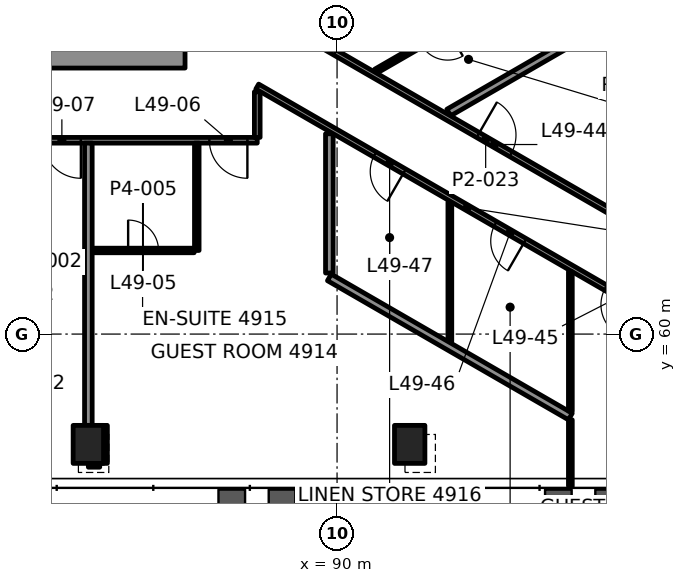
"""IFC4 building model, lengths in metres.
Left out: names, types, materials, properties, quantities, classifications, styles, units other than length and angle.
Written with IfcOpenShell. Run it as: python <this file> out.ifc"""

import sys

from ifc_helpers import new_model, si_unit, direction, frame, frame_2d, origin, origin_2d, place, context, subcontext, project, spatial, rectangle, hollow_rectangle, extrude, element, fill, save


model = new_model("IFC4")
c1 = context("Model", 3, precision=1e-05, world=origin(), true_north=direction((0.0, 1.0)))
c2 = subcontext(c1, "Body", "Model", "MODEL_VIEW")
j1 = project(units=[si_unit("LENGTHUNIT", "METRE"), si_unit("PLANEANGLEUNIT", "RADIAN")], contexts=[c1])
p1 = place(None, origin())
s1 = spatial("IfcSite", under=j1, at=p1, CompositionType="ELEMENT")
p2 = place(p1, origin())
s2 = spatial("IfcBuilding", under=s1, at=p2, CompositionType="ELEMENT")
p3 = place(p2, frame((0.0, 0.0, 210.4)))
s3 = spatial("IfcBuildingStorey", under=s2, at=p3, CompositionType="ELEMENT", Elevation=210.4)
for number, where, z_axis, x_axis in (
    (1, (83.456, 57.097, -0.0), (0.0, 0.0, 1.0), (1.0, 0.0, 0.0)),
    (2, (91.911, 57.097, -0.0), (0.0, 0.0, 1.0), (1.0, 0.0, 0.0)),
):
    element("IfcColumn", number, at=place(p3, frame(where, z_axis=z_axis, x_axis=x_axis)), inside=s3, PredefinedType="COLUMN", context=c2, shape_type="SweptSolid", body=[
        extrude(hollow_rectangle(XDim=0.8, YDim=1.0, WallThickness=0.05, at=origin_2d()), origin(), (0.0, 0.0, 1.0), 3.9),
    ])
p4 = place(p3, frame((64.0, 67.375, 0.0), z_axis=(0.0, 0.0, 1.0), x_axis=(1.0, 0.0, 0.0)))
e3 = element("IfcWall", 3, at=p4, inside=s3, PredefinedType="SHEAR", context=c2, shape_type="SweptSolid", body=[
    extrude(rectangle(XDim=22.0, YDim=0.75, at=frame_2d((11.0, 0.0))), origin(), (0.0, 0.0, 1.0), 3.7),
])
p5 = place(p4, frame((1.575, 0.0, 0.0)))
e4 = element("IfcOpeningElement", 4, at=p5, cuts=e3, PredefinedType="OPENING", context=c2, shape_type="SweptSolid", body=[
    extrude(rectangle(XDim=0.9, YDim=2.1, at=frame_2d((0.45, 1.05))), frame((0.0, 0.385, 0.0), z_axis=(0.0, -1.0, 0.0), x_axis=(1.0, 0.0, 0.0)), (0.0, 0.0, 1.0), 0.77),
])
p6 = place(p4, frame((4.425, 0.0, 0.0)))
e5 = element("IfcOpeningElement", 5, at=p6, cuts=e3, PredefinedType="OPENING", context=c2, shape_type="SweptSolid", body=[
    extrude(rectangle(XDim=0.9, YDim=2.1, at=frame_2d((0.45, 1.05))), frame((0.0, 0.385, 0.0), z_axis=(0.0, -1.0, 0.0), x_axis=(1.0, 0.0, 0.0)), (0.0, 0.0, 1.0), 0.77),
])
p7 = place(p3, frame((83.456, 56.597, 0.0), z_axis=(0.0, 0.0, 1.0), x_axis=(1.0, 0.0, 0.0)))
e6 = element("IfcWall", 6, at=p7, inside=s3, PredefinedType="PARTITIONING", context=c2, shape_type="SweptSolid", body=[
    extrude(rectangle(XDim=0.3, YDim=0.2, at=frame_2d((0.15, 0.0))), origin(), (0.0, 0.0, 1.0), 3.1),
])
p8 = place(p3, frame((83.566, 62.2, 0.0), z_axis=(0.0, 0.0, 1.0), x_axis=(1.0, 0.0, 0.0)))
e7 = element("IfcWall", 7, at=p8, inside=s3, PredefinedType="PARTITIONING", context=c2, shape_type="SweptSolid", body=[
    extrude(rectangle(XDim=2.674, YDim=0.12, at=frame_2d((1.337, 0.0))), origin(), (0.0, 0.0, 1.0), 3.1),
])
p9 = place(p8, frame((0.937, 0.0, 0.0)))
e8 = element("IfcOpeningElement", 8, at=p9, cuts=e7, PredefinedType="OPENING", context=c2, shape_type="SweptSolid", body=[
    extrude(rectangle(XDim=0.8, YDim=2.1, at=frame_2d((0.4, 1.05))), frame((0.0, 0.07, 0.0), z_axis=(0.0, -1.0, 0.0), x_axis=(1.0, 0.0, 0.0)), (0.0, 0.0, 1.0), 0.14),
])
p10 = place(p3, frame((87.899, 65.1, 0.0), z_axis=(0.0, 0.0, 1.0), x_axis=(-1.0, 0.0, 0.0)))
e9 = element("IfcWall", 9, at=p10, inside=s3, PredefinedType="PARTITIONING", context=c2, shape_type="SweptSolid", body=[
    extrude(rectangle(XDim=25.799, YDim=0.15, at=frame_2d((12.899, 0.0))), origin(), (0.0, 0.0, 1.0), 3.1),
])
p11 = place(p10, frame((0.259, 0.0, 0.0)))
e10 = element("IfcOpeningElement", 10, at=p11, cuts=e9, PredefinedType="OPENING", context=c2, shape_type="SweptSolid", body=[
    extrude(rectangle(XDim=1.0, YDim=2.1, at=frame_2d((0.5, 1.05))), frame((0.0, 0.085, 0.0), z_axis=(0.0, -1.0, 0.0), x_axis=(1.0, 0.0, 0.0)), (0.0, 0.0, 1.0), 0.17),
])
p12 = place(p10, frame((4.641, 0.0, 0.0)))
e11 = element("IfcOpeningElement", 11, at=p12, cuts=e9, PredefinedType="OPENING", context=c2, shape_type="SweptSolid", body=[
    extrude(rectangle(XDim=1.0, YDim=2.1, at=frame_2d((0.5, 1.05))), frame((0.0, 0.085, 0.0), z_axis=(0.0, -1.0, 0.0), x_axis=(1.0, 0.0, 0.0)), (0.0, 0.0, 1.0), 0.17),
])
p13 = place(p10, frame((8.868, 0.0, 0.0)))
e12 = element("IfcOpeningElement", 12, at=p13, cuts=e9, PredefinedType="OPENING", context=c2, shape_type="SweptSolid", body=[
    extrude(rectangle(XDim=1.0, YDim=2.1, at=frame_2d((0.5, 1.05))), frame((0.0, 0.085, 0.0), z_axis=(0.0, -1.0, 0.0), x_axis=(1.0, 0.0, 0.0)), (0.0, 0.0, 1.0), 0.17),
])
p14 = place(p10, frame((13.271, 0.0, 0.0)))
e13 = element("IfcOpeningElement", 13, at=p14, cuts=e9, PredefinedType="OPENING", context=c2, shape_type="SweptSolid", body=[
    extrude(rectangle(XDim=1.0, YDim=2.1, at=frame_2d((0.5, 1.05))), frame((0.0, 0.085, 0.0), z_axis=(0.0, -1.0, 0.0), x_axis=(1.0, 0.0, 0.0)), (0.0, 0.0, 1.0), 0.17),
])
p15 = place(p10, frame((19.612, 0.0, 0.0)))
e14 = element("IfcOpeningElement", 14, at=p15, cuts=e9, PredefinedType="OPENING", context=c2, shape_type="SweptSolid", body=[
    extrude(rectangle(XDim=1.0, YDim=2.1, at=frame_2d((0.5, 1.05))), frame((0.0, 0.085, 0.0), z_axis=(0.0, -1.0, 0.0), x_axis=(1.0, 0.0, 0.0)), (0.0, 0.0, 1.0), 0.17),
])
p16 = place(p3, frame((92.938, 65.83, 0.0), z_axis=(0.0, 0.0, 1.0), x_axis=(0.866041300655, 0.499972464802, 0.0)))
e15 = element("IfcWall", 15, at=p16, inside=s3, PredefinedType="PARTITIONING", context=c2, shape_type="SweptSolid", body=[
    extrude(rectangle(XDim=6.452, YDim=0.2, at=frame_2d((3.226, 0.0))), origin(), (0.0, 0.0, 1.0), 3.1),
])
p17 = place(p3, frame((94.109, 68.702, 0.0), z_axis=(0.0, 0.0, 1.0), x_axis=(-0.866028357664, -0.499994883695, 0.0)))
e16 = element("IfcWall", 16, at=p17, inside=s3, PredefinedType="PARTITIONING", context=c2, shape_type="SweptSolid", body=[
    extrude(rectangle(XDim=3.568, YDim=0.12, at=frame_2d((1.784, 0.0))), origin(), (0.0, 0.0, 1.0), 3.1),
])
p18 = place(p17, frame((1.384, 0.0, 0.0)))
e17 = element("IfcOpeningElement", 17, at=p18, cuts=e16, PredefinedType="OPENING", context=c2, shape_type="SweptSolid", body=[
    extrude(rectangle(XDim=0.8, YDim=2.1, at=frame_2d((0.4, 1.05))), frame((0.0, 0.07, 0.0), z_axis=(0.0, -1.0, 0.0), x_axis=(1.0, 0.0, 0.0)), (0.0, 0.0, 1.0), 0.14),
])
p19 = place(p3, frame((96.139, 55.998, 0.0), z_axis=(0.0, 0.0, 1.0), x_axis=(0.0, 1.0, 0.0)))
e18 = element("IfcWall", 18, at=p19, inside=s3, PredefinedType="PARTITIONING", context=c2, shape_type="SweptSolid", body=[
    extrude(rectangle(XDim=1.746, YDim=0.1, at=frame_2d((0.873, 0.0))), origin(), (0.0, 0.0, 1.0), 3.1),
])
p20 = place(p3, frame((92.968, 59.806, 0.0), z_axis=(0.0, 0.0, 1.0), x_axis=(0.0, 1.0, 0.0)))
e19 = element("IfcWall", 19, at=p20, inside=s3, PredefinedType="PARTITIONING", context=c2, shape_type="SweptSolid", body=[
    extrude(rectangle(XDim=3.664, YDim=0.1, at=frame_2d((1.832, 0.0))), origin(), (0.0, 0.0, 1.0), 3.1),
])
p21 = place(p3, frame((89.797, 61.607, 0.0), z_axis=(0.0, 0.0, 1.0), x_axis=(0.0, 1.0, 0.0)))
e20 = element("IfcWall", 20, at=p21, inside=s3, PredefinedType="PARTITIONING", context=c2, shape_type="SweptSolid", body=[
    extrude(rectangle(XDim=3.664, YDim=0.2, at=frame_2d((1.832, 0.0))), origin(), (0.0, 0.0, 1.0), 2.947),
])
p22 = place(p3, frame((87.9, 65.176, 0.0), z_axis=(0.0, 0.0, 1.0), x_axis=(0.0, 1.0, 0.0)))
e21 = element("IfcWall", 21, at=p22, inside=s3, PredefinedType="PARTITIONING", context=c2, shape_type="SweptSolid", body=[
    extrude(rectangle(XDim=1.201, YDim=0.15, at=frame_2d((0.6, 0.0))), origin(), (0.0, 0.0, 1.0), 2.947),
])
p23 = place(p3, frame((86.309, 62.2, 0.0), z_axis=(0.0, 0.0, 1.0), x_axis=(0.0, 1.0, 0.0)))
e22 = element("IfcWall", 22, at=p23, inside=s3, PredefinedType="PARTITIONING", context=c2, shape_type="SweptSolid", body=[
    extrude(rectangle(XDim=2.825, YDim=0.12, at=frame_2d((1.413, 0.0))), origin(), (0.0, 0.0, 1.0), 3.1),
])
p24 = place(p3, frame((83.856, 56.598, 0.0), z_axis=(0.0, 0.0, 1.0), x_axis=(0.0, 1.0, 0.0)))
e23 = element("IfcWall", 23, at=p24, inside=s3, PredefinedType="PARTITIONING", context=c2, shape_type="SweptSolid", body=[
    extrude(rectangle(XDim=0.999, YDim=0.2, at=frame_2d((0.5, 0.0))), origin(), (0.0, 0.0, 1.0), 3.022),
])
p25 = place(p3, frame((83.456, 57.597, 0.0), z_axis=(0.0, 0.0, 1.0), x_axis=(0.0, 1.0, 0.0)))
e24 = element("IfcWall", 24, at=p25, inside=s3, PredefinedType="PARTITIONING", context=c2, shape_type="SweptSolid", body=[
    extrude(rectangle(XDim=7.427, YDim=0.2, at=frame_2d((3.714, 0.0))), origin(), (0.0, 0.0, 1.0), 3.1),
])
p26 = place(p3, frame((87.975, 68.548, 0.0), z_axis=(0.0, 0.0, 1.0), x_axis=(0.866024823711, -0.500001004715, 0.0)))
e25 = element("IfcWall", 25, at=p26, inside=s3, PredefinedType="PARTITIONING", context=c2, shape_type="SweptSolid", body=[
    extrude(rectangle(XDim=13.707, YDim=0.15, at=frame_2d((6.854, 0.0))), origin(), (0.0, 0.0, 1.0), 3.1),
])
p27 = place(p26, frame((1.283, 0.0, 0.0)))
e26 = element("IfcOpeningElement", 26, at=p27, cuts=e25, PredefinedType="OPENING", context=c2, shape_type="SweptSolid", body=[
    extrude(rectangle(XDim=1.0, YDim=2.1, at=frame_2d((0.5, 1.05))), frame((0.0, 0.085, 0.0), z_axis=(0.0, -1.0, 0.0), x_axis=(1.0, 0.0, 0.0)), (0.0, 0.0, 1.0), 0.17),
])
p28 = place(p26, frame((6.62, 0.0, 0.0)))
e27 = element("IfcOpeningElement", 27, at=p28, cuts=e25, PredefinedType="OPENING", context=c2, shape_type="SweptSolid", body=[
    extrude(rectangle(XDim=1.0, YDim=2.1, at=frame_2d((0.5, 1.05))), frame((0.0, 0.085, 0.0), z_axis=(0.0, -1.0, 0.0), x_axis=(1.0, 0.0, 0.0)), (0.0, 0.0, 1.0), 0.17),
])
p29 = place(p3, frame((98.945, 60.136, 0.0), z_axis=(0.0, 0.0, 1.0), x_axis=(-0.866024604137, 0.500001385028, 0.0)))
e28 = element("IfcWall", 28, at=p29, inside=s3, PredefinedType="PARTITIONING", context=c2, shape_type="SweptSolid", body=[
    extrude(rectangle(XDim=12.754, YDim=0.15, at=frame_2d((6.377, 0.0))), origin(), (0.0, 0.0, 1.0), 2.947),
])
p30 = place(p29, frame((1.271, 0.0, 0.0)))
e29 = element("IfcOpeningElement", 29, at=p30, cuts=e28, PredefinedType="OPENING", context=c2, shape_type="SweptSolid", body=[
    extrude(rectangle(XDim=0.9, YDim=2.1, at=frame_2d((0.45, 1.05))), frame((0.0, 0.085, 0.0), z_axis=(0.0, -1.0, 0.0), x_axis=(1.0, 0.0, 0.0)), (0.0, 0.0, 1.0), 0.17),
])
p31 = place(p29, frame((4.621, 0.0, 0.0)))
e30 = element("IfcOpeningElement", 30, at=p31, cuts=e28, PredefinedType="OPENING", context=c2, shape_type="SweptSolid", body=[
    extrude(rectangle(XDim=0.9, YDim=2.1, at=frame_2d((0.45, 1.05))), frame((0.0, 0.085, 0.0), z_axis=(0.0, -1.0, 0.0), x_axis=(1.0, 0.0, 0.0)), (0.0, 0.0, 1.0), 0.17),
])
p32 = place(p29, frame((8.282, 0.0, 0.0)))
e31 = element("IfcOpeningElement", 31, at=p32, cuts=e28, PredefinedType="OPENING", context=c2, shape_type="SweptSolid", body=[
    extrude(rectangle(XDim=0.9, YDim=2.1, at=frame_2d((0.45, 1.05))), frame((0.0, 0.085, 0.0), z_axis=(0.0, -1.0, 0.0), x_axis=(1.0, 0.0, 0.0)), (0.0, 0.0, 1.0), 0.17),
])
p33 = place(p3, frame((96.139, 57.83, 0.0), z_axis=(0.0, 0.0, 1.0), x_axis=(-0.866014584968, 0.500018738272, 0.0)))
e32 = element("IfcWall", 32, at=p33, inside=s3, PredefinedType="PARTITIONING", context=c2, shape_type="SweptSolid", body=[
    extrude(rectangle(XDim=7.323, YDim=0.2, at=frame_2d((3.662, 0.0))), origin(), (0.0, 0.0, 1.0), 3.1),
])
p34 = place(p3, frame((96.139, 57.975, 0.0), z_axis=(0.0, 0.0, 1.0), x_axis=(0.0, 1.0, 0.0)))
e33 = element("IfcWall", 33, at=p34, inside=s3, PredefinedType="PARTITIONING", context=c2, shape_type="SweptSolid", body=[
    extrude(rectangle(XDim=3.665, YDim=0.1, at=frame_2d((1.833, 0.0))), origin(), (0.0, 0.0, 1.0), 3.1),
])
p35 = place(p9, origin())
e34 = element("IfcDoor", 34, at=p35, inside=s3, OperationType="SINGLE_SWING_RIGHT", PredefinedType="DOOR", context=c2, shape_type="SweptSolid", body=[
    extrude(rectangle(XDim=0.8, YDim=2.1, at=frame_2d((0.4, 1.05))), frame((0.0, 0.025, 0.0), z_axis=(0.0, -1.0, 0.0), x_axis=(1.0, 0.0, 0.0)), (0.0, 0.0, 1.0), 0.05),
])
fill(e8, e34)
p36 = place(p11, origin())
e35 = element("IfcDoor", 35, at=p36, inside=s3, OperationType="SINGLE_SWING_RIGHT", PredefinedType="DOOR", context=c2, shape_type="SweptSolid", body=[
    extrude(rectangle(XDim=1.0, YDim=2.1, at=frame_2d((0.5, 1.05))), frame((0.0, 0.025, 0.0), z_axis=(0.0, -1.0, 0.0), x_axis=(1.0, 0.0, 0.0)), (0.0, 0.0, 1.0), 0.05),
])
fill(e10, e35)
p37 = place(p12, origin())
e36 = element("IfcDoor", 36, at=p37, inside=s3, OperationType="SINGLE_SWING_RIGHT", PredefinedType="DOOR", context=c2, shape_type="SweptSolid", body=[
    extrude(rectangle(XDim=1.0, YDim=2.1, at=frame_2d((0.5, 1.05))), frame((0.0, 0.025, 0.0), z_axis=(0.0, -1.0, 0.0), x_axis=(1.0, 0.0, 0.0)), (0.0, 0.0, 1.0), 0.05),
])
fill(e11, e36)
p38 = place(p27, origin())
e37 = element("IfcDoor", 37, at=p38, inside=s3, OperationType="SINGLE_SWING_LEFT", PredefinedType="DOOR", context=c2, shape_type="SweptSolid", body=[
    extrude(rectangle(XDim=1.0, YDim=2.1, at=frame_2d((0.5, 1.05))), frame((0.0, 0.025, 0.0), z_axis=(0.0, -1.0, 0.0), x_axis=(1.0, 0.0, 0.0)), (0.0, 0.0, 1.0), 0.05),
])
fill(e26, e37)
p39 = place(p28, origin())
e38 = element("IfcDoor", 38, at=p39, inside=s3, OperationType="SINGLE_SWING_LEFT", PredefinedType="DOOR", context=c2, shape_type="SweptSolid", body=[
    extrude(rectangle(XDim=1.0, YDim=2.1, at=frame_2d((0.5, 1.05))), frame((0.0, 0.025, 0.0), z_axis=(0.0, -1.0, 0.0), x_axis=(1.0, 0.0, 0.0)), (0.0, 0.0, 1.0), 0.05),
])
fill(e27, e38)
p40 = place(p30, origin())
e39 = element("IfcDoor", 39, at=p40, inside=s3, OperationType="SINGLE_SWING_LEFT", PredefinedType="DOOR", context=c2, shape_type="SweptSolid", body=[
    extrude(rectangle(XDim=0.9, YDim=2.1, at=frame_2d((0.45, 1.05))), frame((0.0, 0.025, 0.0), z_axis=(0.0, -1.0, 0.0), x_axis=(1.0, 0.0, 0.0)), (0.0, 0.0, 1.0), 0.05),
])
fill(e29, e39)
p41 = place(p31, origin())
e40 = element("IfcDoor", 40, at=p41, inside=s3, OperationType="SINGLE_SWING_RIGHT", PredefinedType="DOOR", context=c2, shape_type="SweptSolid", body=[
    extrude(rectangle(XDim=0.9, YDim=2.1, at=frame_2d((0.45, 1.05))), frame((0.0, 0.025, 0.0), z_axis=(0.0, -1.0, 0.0), x_axis=(1.0, 0.0, 0.0)), (0.0, 0.0, 1.0), 0.05),
])
fill(e30, e40)
p42 = place(p32, origin())
e41 = element("IfcDoor", 41, at=p42, inside=s3, OperationType="SINGLE_SWING_LEFT", PredefinedType="DOOR", context=c2, shape_type="SweptSolid", body=[
    extrude(rectangle(XDim=0.9, YDim=2.1, at=frame_2d((0.45, 1.05))), frame((0.0, 0.025, 0.0), z_axis=(0.0, -1.0, 0.0), x_axis=(1.0, 0.0, 0.0)), (0.0, 0.0, 1.0), 0.05),
])
fill(e31, e41)
save(model, sys.argv[1])
